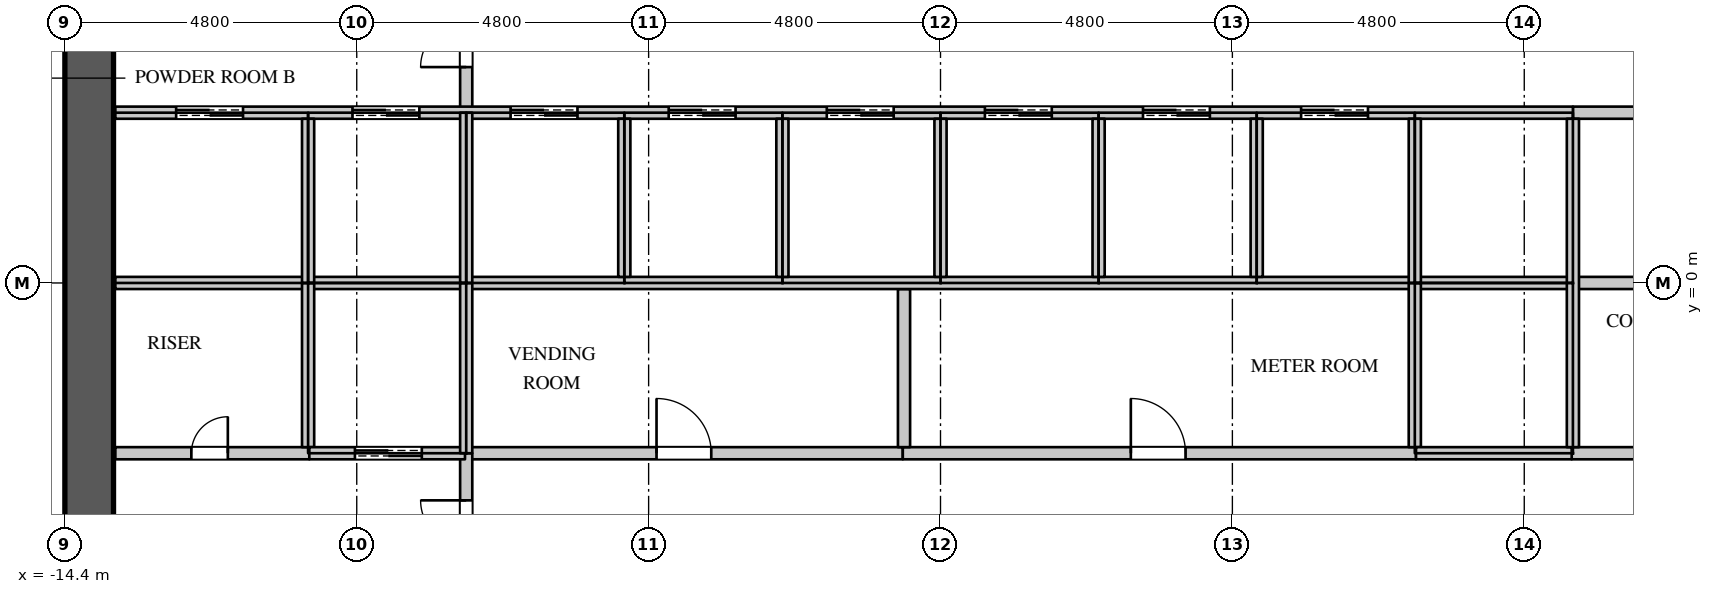
"""IFC4 building model, lengths in metres.
Left out: names, types, materials, properties, quantities, classifications, styles, units other than length and angle.
Written with IfcOpenShell. Run it as: python <this file> out.ifc"""

import sys

from ifc_helpers import new_model, si_unit, direction, frame, frame_2d, origin, place, context, subcontext, project, spatial, rectangle, extrude, element, fill, save


model = new_model("IFC4")
c1 = context("Model", 3, precision=1e-05, world=origin(), true_north=direction((0.0, 1.0)))
c2 = subcontext(c1, "Body", "Model", "MODEL_VIEW")
j1 = project(units=[si_unit("LENGTHUNIT", "METRE"), si_unit("PLANEANGLEUNIT", "RADIAN")], contexts=[c1])
p1 = place(None, origin())
s1 = spatial("IfcSite", under=j1, at=p1, CompositionType="ELEMENT")
p2 = place(p1, origin())
s2 = spatial("IfcBuilding", under=s1, at=p2, CompositionType="ELEMENT")
p3 = place(p2, frame((0.0, 0.0, 119.1)))
s3 = spatial("IfcBuildingStorey", under=s2, at=p3, CompositionType="ELEMENT", Elevation=119.1)
p4 = place(p3, frame((-14.0, -11.2, 0.0), z_axis=(0.0, 0.0, 1.0), x_axis=(0.0, 1.0, 0.0)))
e1 = element("IfcWall", 1, at=p4, inside=s3, PredefinedType="SHEAR", context=c2, shape_type="SweptSolid", body=[
    extrude(rectangle(XDim=22.4, YDim=0.8, at=frame_2d((11.2, 0.0))), origin(), (0.0, 0.0, 1.0), 4.2),
])
p5 = place(p4, frame((20.25, 0.0, 0.0)))
e2 = element("IfcOpeningElement", 2, at=p5, cuts=e1, PredefinedType="OPENING", context=c2, shape_type="SweptSolid", body=[
    extrude(rectangle(XDim=1.1, YDim=2.2, at=frame_2d((0.55, 1.1))), frame((0.0, 0.41, 0.0), z_axis=(0.0, -1.0, 0.0), x_axis=(1.0, 0.0, 0.0)), (0.0, 0.0, 1.0), 0.82),
])
p6 = place(p4, frame((1.05, 0.0, 0.0)))
e3 = element("IfcOpeningElement", 3, at=p6, cuts=e1, PredefinedType="OPENING", context=c2, shape_type="SweptSolid", body=[
    extrude(rectangle(XDim=1.1, YDim=2.2, at=frame_2d((0.55, 1.1))), frame((0.0, 0.41, 0.0), z_axis=(0.0, -1.0, 0.0), x_axis=(1.0, 0.0, 0.0)), (0.0, 0.0, 1.0), 0.82),
])
p7 = place(p4, frame((15.95, 0.0, 0.0)))
e4 = element("IfcOpeningElement", 4, at=p7, cuts=e1, PredefinedType="OPENING", context=c2, shape_type="SweptSolid", body=[
    extrude(rectangle(XDim=1.5, YDim=2.4, at=frame_2d((0.75, 1.2))), frame((0.0, 0.41, 0.0), z_axis=(0.0, -1.0, 0.0), x_axis=(1.0, 0.0, 0.0)), (0.0, 0.0, 1.0), 0.82),
])
p8 = place(p4, frame((4.95, 0.0, 0.0)))
e5 = element("IfcOpeningElement", 5, at=p8, cuts=e1, PredefinedType="OPENING", context=c2, shape_type="SweptSolid", body=[
    extrude(rectangle(XDim=1.5, YDim=2.4, at=frame_2d((0.75, 1.2))), frame((0.0, 0.41, 0.0), z_axis=(0.0, -1.0, 0.0), x_axis=(1.0, 0.0, 0.0)), (0.0, 0.0, 1.0), 0.82),
])
p9 = place(p3, frame((-7.82, -2.8, 0.0), z_axis=(0.0, 0.0, 1.0), x_axis=(1.0, 0.0, 0.0)))
e6 = element("IfcWall", 6, at=p9, inside=s3, PredefinedType="PARTITIONING", context=c2, shape_type="SweptSolid", body=[
    extrude(rectangle(XDim=7.2, YDim=0.2, at=frame_2d((3.6, 0.0))), origin(), (0.0, 0.0, 1.0), 3.95),
])
p10 = place(p9, frame((3.15, 0.0, 0.0)))
e7 = element("IfcOpeningElement", 7, at=p10, cuts=e6, PredefinedType="OPENING", context=c2, shape_type="SweptSolid", body=[
    extrude(rectangle(XDim=0.9, YDim=2.2, at=frame_2d((0.45, 1.1))), frame((0.0, 0.11, 0.0), z_axis=(0.0, -1.0, 0.0), x_axis=(1.0, 0.0, 0.0)), (0.0, 0.0, 1.0), 0.22),
])
p11 = place(p3, frame((-7.8, -8.075, 0.0), z_axis=(0.0, 0.0, 1.0), x_axis=(0.0, 1.0, 0.0)))
e8 = element("IfcWall", 8, at=p11, inside=s3, PredefinedType="PARTITIONING", context=c2, shape_type="SweptSolid", body=[
    extrude(rectangle(XDim=5.275, YDim=0.2, at=frame_2d((2.637, 0.0))), origin(), (0.0, 0.0, 1.0), 3.95),
])
p12 = place(p11, frame((3.0, 0.0, 0.0)))
e9 = element("IfcOpeningElement", 9, at=p12, cuts=e8, PredefinedType="OPENING", context=c2, shape_type="SweptSolid", body=[
    extrude(rectangle(XDim=1.5, YDim=2.4, at=frame_2d((0.75, 1.2))), frame((0.0, 0.11, 0.0), z_axis=(0.0, -1.0, 0.0), x_axis=(1.0, 0.0, 0.0)), (0.0, 0.0, 1.0), 0.22),
])
p13 = place(p3, frame((-7.8, 2.8, 0.0), z_axis=(0.0, 0.0, 1.0), x_axis=(0.0, 1.0, 0.0)))
e10 = element("IfcWall", 10, at=p13, inside=s3, PredefinedType="PARTITIONING", context=c2, shape_type="SweptSolid", body=[
    extrude(rectangle(XDim=5.275, YDim=0.2, at=frame_2d((2.637, 0.0))), origin(), (0.0, 0.0, 1.0), 3.95),
])
p14 = place(p13, frame((0.75, 0.0, 0.0)))
e11 = element("IfcOpeningElement", 11, at=p14, cuts=e10, PredefinedType="OPENING", context=c2, shape_type="SweptSolid", body=[
    extrude(rectangle(XDim=1.5, YDim=2.4, at=frame_2d((0.75, 1.2))), frame((0.0, 0.11, 0.0), z_axis=(0.0, -1.0, 0.0), x_axis=(1.0, 0.0, 0.0)), (0.0, 0.0, 1.0), 0.22),
])
p15 = place(p3, frame((-13.57, -2.8, 0.0), z_axis=(0.0, 0.0, 1.0), x_axis=(1.0, 0.0, 0.0)))
e12 = element("IfcWall", 12, at=p15, inside=s3, PredefinedType="PARTITIONING", context=c2, shape_type="SweptSolid", body=[
    extrude(rectangle(XDim=3.19, YDim=0.2, at=frame_2d((1.595, 0.0))), origin(), (0.0, 0.0, 1.0), 3.95),
])
p16 = place(p15, frame((1.25, 0.0, 0.0)))
e13 = element("IfcOpeningElement", 13, at=p16, cuts=e12, PredefinedType="OPENING", context=c2, shape_type="SweptSolid", body=[
    extrude(rectangle(XDim=0.6, YDim=2.0, at=frame_2d((0.3, 1.0))), frame((0.0, 0.11, 0.0), z_axis=(0.0, -1.0, 0.0), x_axis=(1.0, 0.0, 0.0)), (0.0, 0.0, 1.0), 0.22),
])
p17 = place(p3, frame((-0.62, -2.8, 0.0), z_axis=(0.0, 0.0, 1.0), x_axis=(1.0, 0.0, 0.0)))
e14 = element("IfcWall", 14, at=p17, inside=s3, PredefinedType="PARTITIONING", context=c2, shape_type="SweptSolid", body=[
    extrude(rectangle(XDim=8.44, YDim=0.2, at=frame_2d((4.22, 0.0))), origin(), (0.0, 0.0, 1.0), 3.95),
])
p18 = place(p17, frame((3.75, 0.0, 0.0)))
e15 = element("IfcOpeningElement", 15, at=p18, cuts=e14, PredefinedType="OPENING", context=c2, shape_type="SweptSolid", body=[
    extrude(rectangle(XDim=0.9, YDim=2.2, at=frame_2d((0.45, 1.1))), frame((0.0, 0.11, 0.0), z_axis=(0.0, -1.0, 0.0), x_axis=(1.0, 0.0, 0.0)), (0.0, 0.0, 1.0), 0.22),
])
p19 = place(p3, frame((-0.6, -2.7, 0.0), z_axis=(0.0, 0.0, 1.0), x_axis=(0.0, 1.0, 0.0)))
e16 = element("IfcWall", 16, at=p19, inside=s3, PredefinedType="PARTITIONING", context=c2, shape_type="SweptSolid", body=[
    extrude(rectangle(XDim=2.6, YDim=0.2, at=frame_2d((1.3, 0.0))), origin(), (0.0, 0.0, 1.0), 3.95),
])
p20 = place(p3, frame((10.38, -2.8, 0.0), z_axis=(0.0, 0.0, 1.0), x_axis=(1.0, 0.0, 0.0)))
e17 = element("IfcWall", 17, at=p20, inside=s3, PredefinedType="PARTITIONING", context=c2, shape_type="SweptSolid", body=[
    extrude(rectangle(XDim=3.19, YDim=0.2, at=frame_2d((1.595, 0.0))), origin(), (0.0, 0.0, 1.0), 3.95),
])
p21 = place(p20, frame((1.1, 0.0, 0.0)))
e18 = element("IfcOpeningElement", 18, at=p21, cuts=e17, PredefinedType="OPENING", context=c2, shape_type="SweptSolid", body=[
    extrude(rectangle(XDim=0.9, YDim=2.2, at=frame_2d((0.45, 1.1))), frame((0.0, 0.11, 0.0), z_axis=(0.0, -1.0, 0.0), x_axis=(1.0, 0.0, 0.0)), (0.0, 0.0, 1.0), 0.22),
])
p22 = place(p3, frame((10.4, 2.8, 0.0), z_axis=(0.0, 0.0, 1.0), x_axis=(1.0, 0.0, 0.0)))
e19 = element("IfcWall", 19, at=p22, inside=s3, PredefinedType="PARTITIONING", context=c2, shape_type="SweptSolid", body=[
    extrude(rectangle(XDim=3.17, YDim=0.2, at=frame_2d((1.585, 0.0))), origin(), (0.0, 0.0, 1.0), 3.95),
])
p23 = place(p22, frame((1.25, 0.0, 0.0)))
e20 = element("IfcOpeningElement", 20, at=p23, cuts=e19, PredefinedType="OPENING", context=c2, shape_type="SweptSolid", body=[
    extrude(rectangle(XDim=0.6, YDim=2.0, at=frame_2d((0.3, 1.0))), frame((0.0, 0.11, 0.0), z_axis=(0.0, -1.0, 0.0), x_axis=(1.0, 0.0, 0.0)), (0.0, 0.0, 1.0), 0.22),
])
p24 = place(p3, frame((10.4, 0.0, 0.0), z_axis=(0.0, 0.0, 1.0), x_axis=(1.0, 0.0, 0.0)))
e21 = element("IfcWall", 21, at=p24, inside=s3, PredefinedType="PARTITIONING", context=c2, shape_type="SweptSolid", body=[
    extrude(rectangle(XDim=3.17, YDim=0.2, at=frame_2d((1.585, 0.0))), origin(), (0.0, 0.0, 1.0), 3.95),
])
p25 = place(p3, frame((-13.57, 0.0, 0.0), z_axis=(0.0, 0.0, 1.0), x_axis=(1.0, 0.0, 0.0)))
e22 = element("IfcWall", 22, at=p25, inside=s3, PredefinedType="PARTITIONING", context=c2, shape_type="SweptSolid", body=[
    extrude(rectangle(XDim=23.97, YDim=0.2, at=frame_2d((11.985, 0.0))), origin(), (0.0, 0.0, 1.0), 3.95),
])
p26 = place(p3, frame((-13.57, 2.8, 0.0), z_axis=(0.0, 0.0, 1.0), x_axis=(1.0, 0.0, 0.0)))
e23 = element("IfcWall", 23, at=p26, inside=s3, PredefinedType="PARTITIONING", context=c2, shape_type="SweptSolid", body=[
    extrude(rectangle(XDim=23.97, YDim=0.2, at=frame_2d((11.985, 0.0))), origin(), (0.0, 0.0, 1.0), 3.95),
])
p27 = place(p26, frame((1.0, 0.0, 0.0)))
e24 = element("IfcOpeningElement", 24, at=p27, cuts=e23, PredefinedType="OPENING", context=c2, shape_type="SweptSolid", body=[
    extrude(rectangle(XDim=1.1, YDim=2.2, at=frame_2d((0.55, 1.1))), frame((0.0, 0.11, 0.0), z_axis=(0.0, -1.0, 0.0), x_axis=(1.0, 0.0, 0.0)), (0.0, 0.0, 1.0), 0.22),
])
p28 = place(p26, frame((3.9, 0.0, 0.0)))
e25 = element("IfcOpeningElement", 25, at=p28, cuts=e23, PredefinedType="OPENING", context=c2, shape_type="SweptSolid", body=[
    extrude(rectangle(XDim=1.1, YDim=2.2, at=frame_2d((0.55, 1.1))), frame((0.0, 0.11, 0.0), z_axis=(0.0, -1.0, 0.0), x_axis=(1.0, 0.0, 0.0)), (0.0, 0.0, 1.0), 0.22),
])
p29 = place(p26, frame((6.5, 0.0, 0.0)))
e26 = element("IfcOpeningElement", 26, at=p29, cuts=e23, PredefinedType="OPENING", context=c2, shape_type="SweptSolid", body=[
    extrude(rectangle(XDim=1.1, YDim=2.2, at=frame_2d((0.55, 1.1))), frame((0.0, 0.11, 0.0), z_axis=(0.0, -1.0, 0.0), x_axis=(1.0, 0.0, 0.0)), (0.0, 0.0, 1.0), 0.22),
])
p30 = place(p26, frame((9.1, 0.0, 0.0)))
e27 = element("IfcOpeningElement", 27, at=p30, cuts=e23, PredefinedType="OPENING", context=c2, shape_type="SweptSolid", body=[
    extrude(rectangle(XDim=1.1, YDim=2.2, at=frame_2d((0.55, 1.1))), frame((0.0, 0.11, 0.0), z_axis=(0.0, -1.0, 0.0), x_axis=(1.0, 0.0, 0.0)), (0.0, 0.0, 1.0), 0.22),
])
p31 = place(p26, frame((11.7, 0.0, 0.0)))
e28 = element("IfcOpeningElement", 28, at=p31, cuts=e23, PredefinedType="OPENING", context=c2, shape_type="SweptSolid", body=[
    extrude(rectangle(XDim=1.1, YDim=2.2, at=frame_2d((0.55, 1.1))), frame((0.0, 0.11, 0.0), z_axis=(0.0, -1.0, 0.0), x_axis=(1.0, 0.0, 0.0)), (0.0, 0.0, 1.0), 0.22),
])
p32 = place(p26, frame((14.3, 0.0, 0.0)))
e29 = element("IfcOpeningElement", 29, at=p32, cuts=e23, PredefinedType="OPENING", context=c2, shape_type="SweptSolid", body=[
    extrude(rectangle(XDim=1.1, YDim=2.2, at=frame_2d((0.55, 1.1))), frame((0.0, 0.11, 0.0), z_axis=(0.0, -1.0, 0.0), x_axis=(1.0, 0.0, 0.0)), (0.0, 0.0, 1.0), 0.22),
])
p33 = place(p26, frame((16.9, 0.0, 0.0)))
e30 = element("IfcOpeningElement", 30, at=p33, cuts=e23, PredefinedType="OPENING", context=c2, shape_type="SweptSolid", body=[
    extrude(rectangle(XDim=1.1, YDim=2.2, at=frame_2d((0.55, 1.1))), frame((0.0, 0.11, 0.0), z_axis=(0.0, -1.0, 0.0), x_axis=(1.0, 0.0, 0.0)), (0.0, 0.0, 1.0), 0.22),
])
p34 = place(p26, frame((19.5, 0.0, 0.0)))
e31 = element("IfcOpeningElement", 31, at=p34, cuts=e23, PredefinedType="OPENING", context=c2, shape_type="SweptSolid", body=[
    extrude(rectangle(XDim=1.1, YDim=2.2, at=frame_2d((0.55, 1.1))), frame((0.0, 0.11, 0.0), z_axis=(0.0, -1.0, 0.0), x_axis=(1.0, 0.0, 0.0)), (0.0, 0.0, 1.0), 0.22),
])
p35 = place(p3, frame((-10.4, -2.7, 0.0), z_axis=(0.0, 0.0, 1.0), x_axis=(0.0, 1.0, 0.0)))
e32 = element("IfcWall", 32, at=p35, inside=s3, PredefinedType="PARTITIONING", context=c2, shape_type="SweptSolid", body=[
    extrude(rectangle(XDim=2.7, YDim=0.2, at=frame_2d((1.35, 0.0))), origin(), (0.0, 0.0, 1.0), 3.95),
])
p36 = place(p3, frame((-10.38, -2.8, 0.0), z_axis=(0.0, 0.0, 1.0), x_axis=(1.0, 0.0, 0.0)))
e33 = element("IfcWall", 33, at=p36, inside=s3, PredefinedType="PARTITIONING", context=c2, shape_type="SweptSolid", body=[
    extrude(rectangle(XDim=2.56, YDim=0.2, at=frame_2d((1.28, 0.0))), origin(), (0.0, 0.0, 1.0), 3.95),
])
p37 = place(p36, frame((0.75, 0.0, 0.0)))
e34 = element("IfcOpeningElement", 34, at=p37, cuts=e33, PredefinedType="OPENING", context=c2, shape_type="SweptSolid", body=[
    extrude(rectangle(XDim=1.1, YDim=2.2, at=frame_2d((0.55, 1.1))), frame((0.0, 0.11, 0.0), z_axis=(0.0, -1.0, 0.0), x_axis=(1.0, 0.0, 0.0)), (0.0, 0.0, 1.0), 0.22),
])
p38 = place(p3, frame((-10.4, 0.0, 0.0), z_axis=(0.0, 0.0, 1.0), x_axis=(0.0, 1.0, 0.0)))
e35 = element("IfcWall", 35, at=p38, inside=s3, PredefinedType="PARTITIONING", context=c2, shape_type="SweptSolid", body=[
    extrude(rectangle(XDim=2.7, YDim=0.2, at=frame_2d((1.35, 0.0))), origin(), (0.0, 0.0, 1.0), 3.95),
])
for number, where, z_axis, x_axis in (
    (36, (-7.8, -2.8, 0.0), (0.0, 0.0, 1.0), (0.0, 1.0, 0.0)),
    (37, (-7.8, 0.0, 0.0), (0.0, 0.0, 1.0), (0.0, 1.0, 0.0)),
):
    element("IfcWall", number, at=place(p3, frame(where, z_axis=z_axis, x_axis=x_axis)), inside=s3, PredefinedType="PARTITIONING", context=c2, shape_type="SweptSolid", body=[
        extrude(rectangle(XDim=2.8, YDim=0.2, at=frame_2d((1.4, 0.0))), origin(), (0.0, 0.0, 1.0), 3.95),
    ])
for number, where, z_axis, x_axis in (
    (38, (-5.2, 0.1, 0.0), (0.0, 0.0, 1.0), (0.0, 1.0, 0.0)),
    (39, (-2.6, 0.1, 0.0), (0.0, 0.0, 1.0), (0.0, 1.0, 0.0)),
    (40, (0.0, 0.1, 0.0), (0.0, 0.0, 1.0), (0.0, 1.0, 0.0)),
    (41, (2.6, 0.1, 0.0), (0.0, 0.0, 1.0), (0.0, 1.0, 0.0)),
    (42, (5.2, 0.1, 0.0), (0.0, 0.0, 1.0), (0.0, 1.0, 0.0)),
):
    element("IfcWall", number, at=place(p3, frame(where, z_axis=z_axis, x_axis=x_axis)), inside=s3, PredefinedType="PARTITIONING", context=c2, shape_type="SweptSolid", body=[
        extrude(rectangle(XDim=2.6, YDim=0.2, at=frame_2d((1.3, 0.0))), origin(), (0.0, 0.0, 1.0), 3.95),
    ])
p39 = place(p3, frame((7.8, -2.7, 0.0), z_axis=(0.0, 0.0, 1.0), x_axis=(0.0, 1.0, 0.0)))
e43 = element("IfcWall", 43, at=p39, inside=s3, PredefinedType="PARTITIONING", context=c2, shape_type="SweptSolid", body=[
    extrude(rectangle(XDim=2.7, YDim=0.2, at=frame_2d((1.35, 0.0))), origin(), (0.0, 0.0, 1.0), 3.95),
])
p40 = place(p3, frame((7.82, -2.8, 0.0), z_axis=(0.0, 0.0, 1.0), x_axis=(1.0, 0.0, 0.0)))
e44 = element("IfcWall", 44, at=p40, inside=s3, PredefinedType="PARTITIONING", context=c2, shape_type="SweptSolid", body=[
    extrude(rectangle(XDim=2.56, YDim=0.2, at=frame_2d((1.28, 0.0))), origin(), (0.0, 0.0, 1.0), 3.95),
])
p41 = place(p3, frame((7.8, 0.0, 0.0), z_axis=(0.0, 0.0, 1.0), x_axis=(0.0, 1.0, 0.0)))
e45 = element("IfcWall", 45, at=p41, inside=s3, PredefinedType="PARTITIONING", context=c2, shape_type="SweptSolid", body=[
    extrude(rectangle(XDim=2.7, YDim=0.2, at=frame_2d((1.35, 0.0))), origin(), (0.0, 0.0, 1.0), 3.95),
])
p42 = place(p3, frame((10.4, -2.7, 0.0), z_axis=(0.0, 0.0, 1.0), x_axis=(0.0, 1.0, 0.0)))
e46 = element("IfcWall", 46, at=p42, inside=s3, PredefinedType="PARTITIONING", context=c2, shape_type="SweptSolid", body=[
    extrude(rectangle(XDim=5.4, YDim=0.2, at=frame_2d((2.7, 0.0))), origin(), (0.0, 0.0, 1.0), 3.95),
])
p43 = place(p16, origin())
e47 = element("IfcDoor", 47, at=p43, inside=s3, OperationType="SINGLE_SWING_RIGHT", PredefinedType="DOOR", context=c2, shape_type="SweptSolid", body=[
    extrude(rectangle(XDim=0.6, YDim=2.0, at=frame_2d((0.3, 1.0))), frame((0.0, 0.025, 0.0), z_axis=(0.0, -1.0, 0.0), x_axis=(1.0, 0.0, 0.0)), (0.0, 0.0, 1.0), 0.05),
])
fill(e13, e47)
p44 = place(p10, origin())
e48 = element("IfcDoor", 48, at=p44, inside=s3, OperationType="SINGLE_SWING_LEFT", PredefinedType="DOOR", context=c2, shape_type="SweptSolid", body=[
    extrude(rectangle(XDim=0.9, YDim=2.2, at=frame_2d((0.45, 1.1))), frame((0.0, 0.025, 0.0), z_axis=(0.0, -1.0, 0.0), x_axis=(1.0, 0.0, 0.0)), (0.0, 0.0, 1.0), 0.05),
])
fill(e7, e48)
p45 = place(p18, origin())
e49 = element("IfcDoor", 49, at=p45, inside=s3, OperationType="SINGLE_SWING_LEFT", PredefinedType="DOOR", context=c2, shape_type="SweptSolid", body=[
    extrude(rectangle(XDim=0.9, YDim=2.2, at=frame_2d((0.45, 1.1))), frame((0.0, 0.025, 0.0), z_axis=(0.0, -1.0, 0.0), x_axis=(1.0, 0.0, 0.0)), (0.0, 0.0, 1.0), 0.05),
])
fill(e15, e49)
p46 = place(p27, origin())
e50 = element("IfcDoor", 50, at=p46, inside=s3, OperationType="DOUBLE_DOOR_SLIDING", PredefinedType="DOOR", context=c2, shape_type="SweptSolid", body=[
    extrude(rectangle(XDim=1.1, YDim=2.2, at=frame_2d((0.55, 1.1))), frame((0.0, 0.025, 0.0), z_axis=(0.0, -1.0, 0.0), x_axis=(1.0, 0.0, 0.0)), (0.0, 0.0, 1.0), 0.05),
])
fill(e24, e50)
p47 = place(p28, origin())
e51 = element("IfcDoor", 51, at=p47, inside=s3, OperationType="DOUBLE_DOOR_SLIDING", PredefinedType="DOOR", context=c2, shape_type="SweptSolid", body=[
    extrude(rectangle(XDim=1.1, YDim=2.2, at=frame_2d((0.55, 1.1))), frame((0.0, 0.025, 0.0), z_axis=(0.0, -1.0, 0.0), x_axis=(1.0, 0.0, 0.0)), (0.0, 0.0, 1.0), 0.05),
])
fill(e25, e51)
p48 = place(p37, origin())
e52 = element("IfcDoor", 52, at=p48, inside=s3, OperationType="DOUBLE_DOOR_SLIDING", PredefinedType="DOOR", context=c2, shape_type="SweptSolid", body=[
    extrude(rectangle(XDim=1.1, YDim=2.2, at=frame_2d((0.55, 1.1))), frame((0.0, 0.025, 0.0), z_axis=(0.0, -1.0, 0.0), x_axis=(1.0, 0.0, 0.0)), (0.0, 0.0, 1.0), 0.05),
])
fill(e34, e52)
p49 = place(p29, origin())
e53 = element("IfcDoor", 53, at=p49, inside=s3, OperationType="DOUBLE_DOOR_SLIDING", PredefinedType="DOOR", context=c2, shape_type="SweptSolid", body=[
    extrude(rectangle(XDim=1.1, YDim=2.2, at=frame_2d((0.55, 1.1))), frame((0.0, 0.025, 0.0), z_axis=(0.0, -1.0, 0.0), x_axis=(1.0, 0.0, 0.0)), (0.0, 0.0, 1.0), 0.05),
])
fill(e26, e53)
p50 = place(p30, origin())
e54 = element("IfcDoor", 54, at=p50, inside=s3, OperationType="DOUBLE_DOOR_SLIDING", PredefinedType="DOOR", context=c2, shape_type="SweptSolid", body=[
    extrude(rectangle(XDim=1.1, YDim=2.2, at=frame_2d((0.55, 1.1))), frame((0.0, 0.025, 0.0), z_axis=(0.0, -1.0, 0.0), x_axis=(1.0, 0.0, 0.0)), (0.0, 0.0, 1.0), 0.05),
])
fill(e27, e54)
p51 = place(p31, origin())
e55 = element("IfcDoor", 55, at=p51, inside=s3, OperationType="DOUBLE_DOOR_SLIDING", PredefinedType="DOOR", context=c2, shape_type="SweptSolid", body=[
    extrude(rectangle(XDim=1.1, YDim=2.2, at=frame_2d((0.55, 1.1))), frame((0.0, 0.025, 0.0), z_axis=(0.0, -1.0, 0.0), x_axis=(1.0, 0.0, 0.0)), (0.0, 0.0, 1.0), 0.05),
])
fill(e28, e55)
p52 = place(p32, origin())
e56 = element("IfcDoor", 56, at=p52, inside=s3, OperationType="DOUBLE_DOOR_SLIDING", PredefinedType="DOOR", context=c2, shape_type="SweptSolid", body=[
    extrude(rectangle(XDim=1.1, YDim=2.2, at=frame_2d((0.55, 1.1))), frame((0.0, 0.025, 0.0), z_axis=(0.0, -1.0, 0.0), x_axis=(1.0, 0.0, 0.0)), (0.0, 0.0, 1.0), 0.05),
])
fill(e29, e56)
p53 = place(p33, origin())
e57 = element("IfcDoor", 57, at=p53, inside=s3, OperationType="DOUBLE_DOOR_SLIDING", PredefinedType="DOOR", context=c2, shape_type="SweptSolid", body=[
    extrude(rectangle(XDim=1.1, YDim=2.2, at=frame_2d((0.55, 1.1))), frame((0.0, 0.025, 0.0), z_axis=(0.0, -1.0, 0.0), x_axis=(1.0, 0.0, 0.0)), (0.0, 0.0, 1.0), 0.05),
])
fill(e30, e57)
p54 = place(p34, origin())
e58 = element("IfcDoor", 58, at=p54, inside=s3, OperationType="DOUBLE_DOOR_SLIDING", PredefinedType="DOOR", context=c2, shape_type="SweptSolid", body=[
    extrude(rectangle(XDim=1.1, YDim=2.2, at=frame_2d((0.55, 1.1))), frame((0.0, 0.025, 0.0), z_axis=(0.0, -1.0, 0.0), x_axis=(1.0, 0.0, 0.0)), (0.0, 0.0, 1.0), 0.05),
])
fill(e31, e58)
p55 = place(p14, origin())
e59 = element("IfcDoor", 59, at=p55, inside=s3, OperationType="DOUBLE_DOOR_SINGLE_SWING", PredefinedType="DOOR", context=c2, shape_type="SweptSolid", body=[
    extrude(rectangle(XDim=1.5, YDim=2.4, at=frame_2d((0.75, 1.2))), frame((0.0, 0.025, 0.0), z_axis=(0.0, -1.0, 0.0), x_axis=(1.0, 0.0, 0.0)), (0.0, 0.0, 1.0), 0.05),
])
fill(e11, e59)
p56 = place(p12, origin())
e60 = element("IfcDoor", 60, at=p56, inside=s3, OperationType="DOUBLE_DOOR_SINGLE_SWING", PredefinedType="DOOR", context=c2, shape_type="SweptSolid", body=[
    extrude(rectangle(XDim=1.5, YDim=2.4, at=frame_2d((0.75, 1.2))), frame((0.0, 0.025, 0.0), z_axis=(0.0, -1.0, 0.0), x_axis=(1.0, 0.0, 0.0)), (0.0, 0.0, 1.0), 0.05),
])
fill(e9, e60)
save(model, sys.argv[1])
